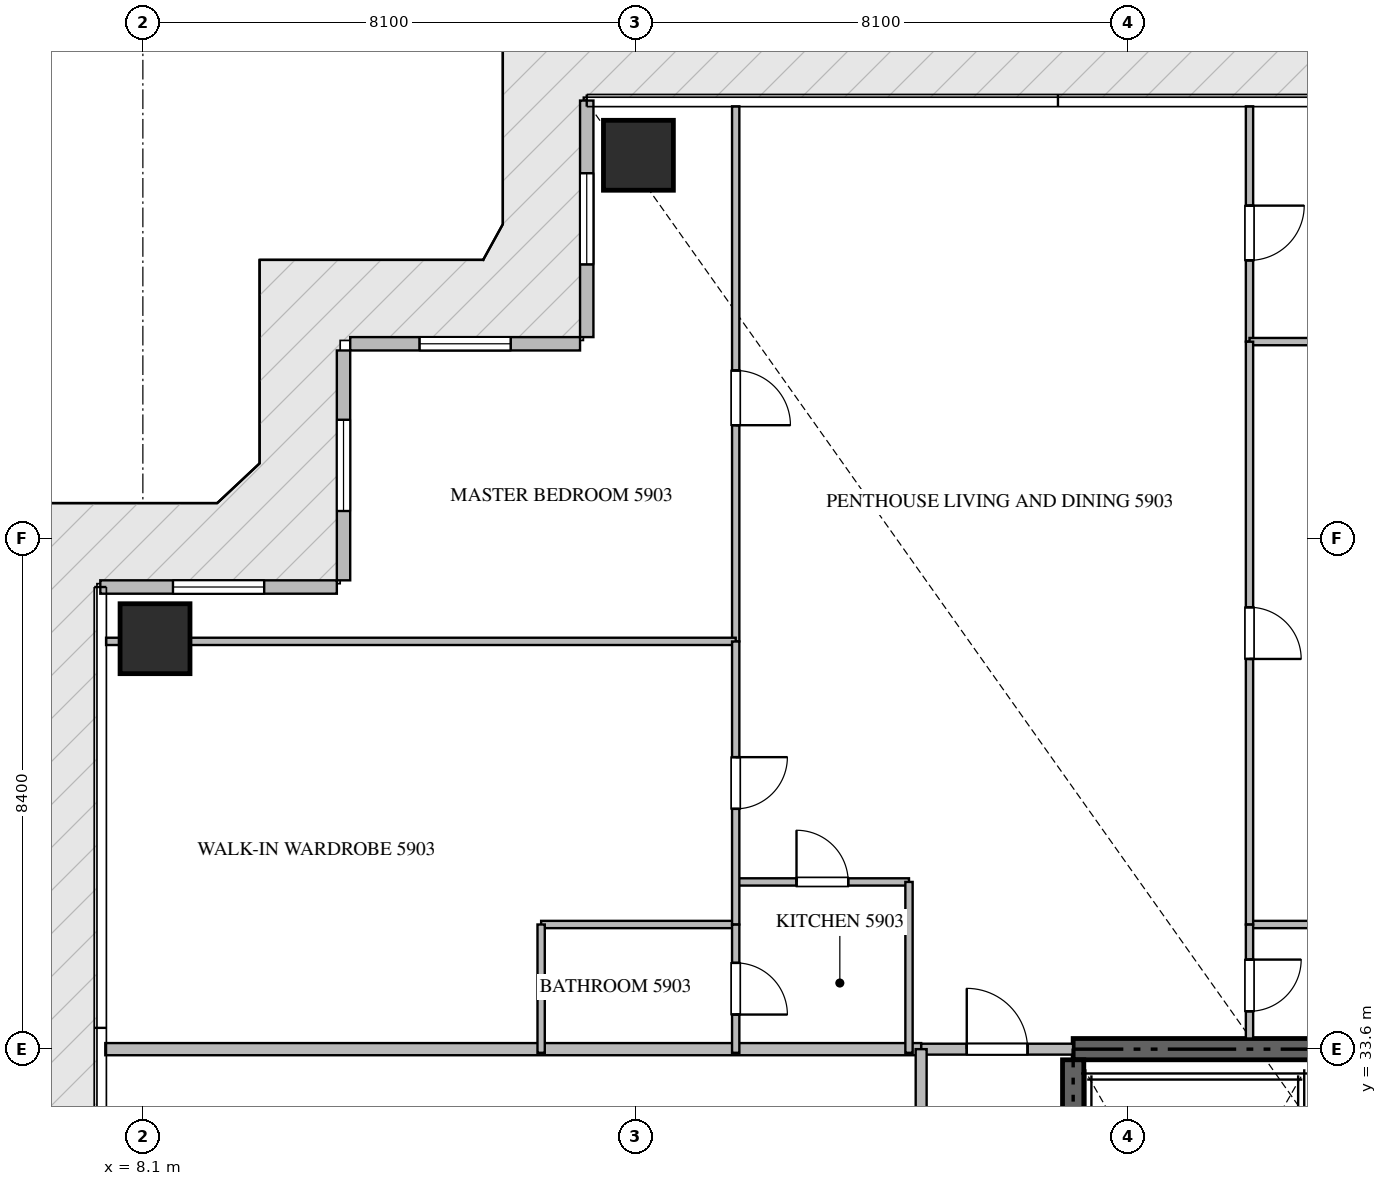
"""IFC4 building model, lengths in metres.
Left out: names, types, materials, properties, quantities, classifications, styles, units other than length and angle.
Written with IfcOpenShell. Run it as: python <this file> out.ifc"""

import sys

from ifc_helpers import new_model, si_unit, direction, frame, frame_2d, origin, origin_2d, place, context, subcontext, project, spatial, rectangle, extrude, source, transform, mapped, element, fill, save


model = new_model("IFC4")
c1 = context("Model", 3, precision=1e-05, world=origin(), true_north=direction((0.0, 1.0)))
c2 = subcontext(c1, "Body", "Model", "MODEL_VIEW")
j1 = project(units=[si_unit("LENGTHUNIT", "METRE"), si_unit("PLANEANGLEUNIT", "RADIAN")], contexts=[c1])
p1 = place(None, origin())
s1 = spatial("IfcSite", under=j1, at=p1, CompositionType="ELEMENT")
p2 = place(p1, origin())
s2 = spatial("IfcBuilding", under=s1, at=p2, CompositionType="ELEMENT")
p3 = place(p2, frame((0.0, 0.0, 237.4)))
s3 = spatial("IfcBuildingStorey", under=s2, at=p3, CompositionType="ELEMENT", Elevation=237.4)
p4 = place(p3, frame((41.4, 33.6, -0.26), z_axis=(0.0, 0.0, 1.0), x_axis=(-1.0, 0.0, 0.0)))
e1 = element("IfcWall", 1, at=p4, inside=s3, PredefinedType="SHEAR", context=c2, shape_type="SweptSolid", body=[
    extrude(rectangle(XDim=18.0, YDim=0.35, at=frame_2d((9.0, 0.0))), origin(), (0.0, 0.0, 1.0), 3.848),
])
p5 = place(p3, frame((23.4, 24.25, -0.26), z_axis=(0.0, 0.0, 1.0), x_axis=(0.0, 1.0, 0.0)))
e2 = element("IfcWall", 2, at=p5, inside=s3, PredefinedType="SHEAR", context=c2, shape_type="SweptSolid", body=[
    extrude(rectangle(XDim=9.175, YDim=0.35, at=frame_2d((4.587, 0.0))), origin(), (0.0, 0.0, 1.0), 3.848),
])
m1 = source(origin(), c2, "Body", "SweptSolid", [
    extrude(rectangle(XDim=1.15, YDim=1.15, at=origin_2d()), origin(), (0.0, 0.0, 1.0), 3.85),
])
for number, where, z_axis, x_axis in (
    (3, (16.25, 48.3, -0.26), (0.0, 0.0, 1.0), (1.0, 0.0, 0.0)),
    (4, (8.3, 40.35, -0.26), (0.0, 0.0, 1.0), (1.0, 0.0, 0.0)),
):
    element("IfcColumn", number, at=place(p3, frame(where, z_axis=z_axis, x_axis=x_axis)), inside=s3, PredefinedType="COLUMN", context=c2, shape_type="MappedRepresentation", body=[
        mapped(m1, transform((0.0, 0.0, 0.0), scale=1.0)),
    ])
p6 = place(p3, frame((15.4, 49.2, 0.0), z_axis=(0.0, 0.0, 1.0), x_axis=(0.0, -1.0, 0.0)))
e5 = element("IfcWall", 5, at=p6, inside=s3, PredefinedType="ELEMENTEDWALL", context=c2, shape_type="SweptSolid", body=[
    extrude(rectangle(XDim=3.89, YDim=0.22, at=frame_2d((1.945, 0.0))), origin(), (0.0, 0.0, 1.0), 3.575),
])
p7 = place(p6, frame((1.195, 0.0, 0.65)))
e6 = element("IfcOpeningElement", 6, at=p7, cuts=e5, PredefinedType="OPENING", context=c2, shape_type="SweptSolid", body=[
    extrude(rectangle(XDim=1.5, YDim=2.25, at=frame_2d((0.75, 1.125))), frame((0.0, 0.12, 0.0), z_axis=(0.0, -1.0, 0.0), x_axis=(1.0, 0.0, 0.0)), (0.0, 0.0, 1.0), 0.24),
])
p8 = place(p3, frame((15.29, 45.2, 0.0), z_axis=(0.0, 0.0, 1.0), x_axis=(-1.0, 0.0, 0.0)))
e7 = element("IfcWall", 7, at=p8, inside=s3, PredefinedType="ELEMENTEDWALL", context=c2, shape_type="SweptSolid", body=[
    extrude(rectangle(XDim=3.78, YDim=0.22, at=frame_2d((1.89, 0.0))), origin(), (0.0, 0.0, 1.0), 3.575),
])
p9 = place(p8, frame((1.14, 0.0, 0.65)))
e8 = element("IfcOpeningElement", 8, at=p9, cuts=e7, PredefinedType="OPENING", context=c2, shape_type="SweptSolid", body=[
    extrude(rectangle(XDim=1.5, YDim=2.25, at=frame_2d((0.75, 1.125))), frame((0.0, 0.12, 0.0), z_axis=(0.0, -1.0, 0.0), x_axis=(1.0, 0.0, 0.0)), (0.0, 0.0, 1.0), 0.24),
])
p10 = place(p3, frame((11.4, 45.09, 0.0), z_axis=(0.0, 0.0, 1.0), x_axis=(0.0, -1.0, 0.0)))
e9 = element("IfcWall", 9, at=p10, inside=s3, PredefinedType="ELEMENTEDWALL", context=c2, shape_type="SweptSolid", body=[
    extrude(rectangle(XDim=3.78, YDim=0.22, at=frame_2d((1.89, 0.0))), origin(), (0.0, 0.0, 1.0), 3.575),
])
p11 = place(p10, frame((1.14, 0.0, 0.65)))
e10 = element("IfcOpeningElement", 10, at=p11, cuts=e9, PredefinedType="OPENING", context=c2, shape_type="SweptSolid", body=[
    extrude(rectangle(XDim=1.5, YDim=2.25, at=frame_2d((0.75, 1.125))), frame((0.0, 0.12, 0.0), z_axis=(0.0, -1.0, 0.0), x_axis=(1.0, 0.0, 0.0)), (0.0, 0.0, 1.0), 0.24),
])
p12 = place(p3, frame((11.29, 41.2, 0.0), z_axis=(0.0, 0.0, 1.0), x_axis=(-1.0, 0.0, 0.0)))
e11 = element("IfcWall", 11, at=p12, inside=s3, PredefinedType="ELEMENTEDWALL", context=c2, shape_type="SweptSolid", body=[
    extrude(rectangle(XDim=3.89, YDim=0.22, at=frame_2d((1.945, 0.0))), origin(), (0.0, 0.0, 1.0), 3.575),
])
p13 = place(p12, frame((1.195, 0.0, 0.65)))
e12 = element("IfcOpeningElement", 12, at=p13, cuts=e11, PredefinedType="OPENING", context=c2, shape_type="SweptSolid", body=[
    extrude(rectangle(XDim=1.5, YDim=2.25, at=frame_2d((0.75, 1.125))), frame((0.0, 0.12, 0.0), z_axis=(0.0, -1.0, 0.0), x_axis=(1.0, 0.0, 0.0)), (0.0, 0.0, 1.0), 0.24),
])
p14 = place(p3, frame((7.482, 33.6, 0.0), z_axis=(0.0, 0.0, 1.0), x_axis=(1.0, 0.0, 0.0)))
e13 = element("IfcWall", 13, at=p14, inside=s3, PredefinedType="PARTITIONING", context=c2, shape_type="SweptSolid", body=[
    extrude(rectangle(XDim=13.418, YDim=0.2, at=frame_2d((6.709, 0.0))), origin(), (0.0, 0.0, 1.0), 3.59),
])
p15 = place(p3, frame((20.902, 33.6, 0.0), z_axis=(0.0, 0.0, 1.0), x_axis=(1.0, 0.0, 0.0)))
e14 = element("IfcWall", 14, at=p15, inside=s3, PredefinedType="PARTITIONING", context=c2, shape_type="SweptSolid", body=[
    extrude(rectangle(XDim=2.496, YDim=0.18, at=frame_2d((1.248, 0.0))), origin(), (0.0, 0.0, 1.0), 3.59),
])
p16 = place(p15, frame((0.748, 0.0, 0.0)))
e15 = element("IfcOpeningElement", 15, at=p16, cuts=e14, PredefinedType="OPENING", context=c2, shape_type="SweptSolid", body=[
    extrude(rectangle(XDim=1.0, YDim=2.15, at=frame_2d((0.5, 1.075))), frame((0.0, 0.1, 0.0), z_axis=(0.0, -1.0, 0.0), x_axis=(1.0, 0.0, 0.0)), (0.0, 0.0, 1.0), 0.2),
])
p17 = place(p3, frame((20.9, 16.8, 0.0), z_axis=(0.0, 0.0, 1.0), x_axis=(0.0, 1.0, 0.0)))
e16 = element("IfcWall", 16, at=p17, inside=s3, PredefinedType="PARTITIONING", context=c2, shape_type="SweptSolid", body=[
    extrude(rectangle(XDim=16.8, YDim=0.18, at=frame_2d((8.4, 0.0))), origin(), (0.0, 0.0, 1.0), 3.59),
])
p18 = place(p17, frame((1.3, 0.0, 0.0)))
e17 = element("IfcOpeningElement", 17, at=p18, cuts=e16, PredefinedType="OPENING", context=c2, shape_type="SweptSolid", body=[
    extrude(rectangle(XDim=1.0, YDim=2.15, at=frame_2d((0.5, 1.075))), frame((0.0, 0.1, 0.0), z_axis=(0.0, -1.0, 0.0), x_axis=(1.0, 0.0, 0.0)), (0.0, 0.0, 1.0), 0.2),
])
p19 = place(p17, frame((9.18, 0.0, 0.0)))
e18 = element("IfcOpeningElement", 18, at=p19, cuts=e16, PredefinedType="OPENING", context=c2, shape_type="SweptSolid", body=[
    extrude(rectangle(XDim=1.0, YDim=2.15, at=frame_2d((0.5, 1.075))), frame((0.0, 0.1, 0.0), z_axis=(0.0, -1.0, 0.0), x_axis=(1.0, 0.0, 0.0)), (0.0, 0.0, 1.0), 0.2),
])
p20 = place(p17, frame((14.5, 0.0, 0.0)))
e19 = element("IfcOpeningElement", 19, at=p20, cuts=e16, PredefinedType="OPENING", context=c2, shape_type="SweptSolid", body=[
    extrude(rectangle(XDim=1.0, YDim=2.15, at=frame_2d((0.5, 1.075))), frame((0.0, 0.1, 0.0), z_axis=(0.0, -1.0, 0.0), x_axis=(1.0, 0.0, 0.0)), (0.0, 0.0, 1.0), 0.2),
])
p21 = place(p3, frame((17.85, 36.35, 0.0), z_axis=(0.0, 0.0, 1.0), x_axis=(1.0, 0.0, 0.0)))
e20 = element("IfcWall", 20, at=p21, inside=s3, PredefinedType="PARTITIONING", context=c2, shape_type="SweptSolid", body=[
    extrude(rectangle(XDim=2.85, YDim=0.12, at=frame_2d((1.425, 0.0))), origin(), (0.0, 0.0, 1.0), 3.59),
])
p22 = place(p21, frame((1.0, 0.0, 0.0)))
e21 = element("IfcOpeningElement", 21, at=p22, cuts=e20, PredefinedType="OPENING", context=c2, shape_type="SweptSolid", body=[
    extrude(rectangle(XDim=0.85, YDim=2.1, at=frame_2d((0.425, 1.05))), frame((0.0, 0.07, 0.0), z_axis=(0.0, -1.0, 0.0), x_axis=(1.0, 0.0, 0.0)), (0.0, 0.0, 1.0), 0.14),
])
p23 = place(p3, frame((20.7, 36.35, 0.0), z_axis=(0.0, 0.0, 1.0), x_axis=(0.0, -1.0, 0.0)))
e22 = element("IfcWall", 22, at=p23, inside=s3, PredefinedType="PARTITIONING", context=c2, shape_type="SweptSolid", body=[
    extrude(rectangle(XDim=2.81, YDim=0.12, at=frame_2d((1.405, 0.0))), origin(), (0.0, 0.0, 1.0), 3.59),
])
p24 = place(p3, frame((17.85, 49.105, 0.0), z_axis=(0.0, 0.0, 1.0), x_axis=(0.0, -1.0, 0.0)))
e23 = element("IfcWall", 23, at=p24, inside=s3, PredefinedType="PARTITIONING", context=c2, shape_type="SweptSolid", body=[
    extrude(rectangle(XDim=8.799, YDim=0.12, at=frame_2d((4.399, 0.0))), origin(), (0.0, 0.0, 1.0), 3.59),
])
p25 = place(p24, frame((4.344, 0.0, 0.0)))
e24 = element("IfcOpeningElement", 24, at=p25, cuts=e23, PredefinedType="OPENING", context=c2, shape_type="SweptSolid", body=[
    extrude(rectangle(XDim=0.9, YDim=2.1, at=frame_2d((0.45, 1.05))), frame((0.0, 0.07, 0.0), z_axis=(0.0, -1.0, 0.0), x_axis=(1.0, 0.0, 0.0)), (0.0, 0.0, 1.0), 0.14),
])
p26 = place(p3, frame((7.495, 40.306, 0.0), z_axis=(0.0, 0.0, 1.0), x_axis=(1.0, 0.0, 0.0)))
e25 = element("IfcWall", 25, at=p26, inside=s3, PredefinedType="PARTITIONING", context=c2, shape_type="SweptSolid", body=[
    extrude(rectangle(XDim=10.355, YDim=0.12, at=frame_2d((5.177, 0.0))), origin(), (0.0, 0.0, 1.0), 3.122),
])
p27 = place(p3, frame((14.65, 35.65, 0.0), z_axis=(0.0, 0.0, 1.0), x_axis=(1.0, 0.0, 0.0)))
e26 = element("IfcWall", 26, at=p27, inside=s3, PredefinedType="PARTITIONING", context=c2, shape_type="SweptSolid", body=[
    extrude(rectangle(XDim=3.2, YDim=0.12, at=frame_2d((1.6, 0.0))), origin(), (0.0, 0.0, 1.0), 3.59),
])
p28 = place(p3, frame((14.65, 35.65, 0.0), z_axis=(0.0, 0.0, 1.0), x_axis=(0.0, -1.0, 0.0)))
e27 = element("IfcWall", 27, at=p28, inside=s3, PredefinedType="PARTITIONING", context=c2, shape_type="SweptSolid", body=[
    extrude(rectangle(XDim=2.11, YDim=0.12, at=frame_2d((1.055, 0.0))), origin(), (0.0, 0.0, 1.0), 3.59),
])
p29 = place(p3, frame((17.85, 40.304, 0.0), z_axis=(0.0, 0.0, 1.0), x_axis=(0.0, -1.0, 0.0)))
e28 = element("IfcWall", 28, at=p29, inside=s3, PredefinedType="PARTITIONING", context=c2, shape_type="SweptSolid", body=[
    extrude(rectangle(XDim=4.654, YDim=0.12, at=frame_2d((2.327, 0.0))), origin(), (0.0, 0.0, 1.0), 3.59),
])
p30 = place(p29, frame((1.902, 0.0, 0.0)))
e29 = element("IfcOpeningElement", 29, at=p30, cuts=e28, PredefinedType="OPENING", context=c2, shape_type="SweptSolid", body=[
    extrude(rectangle(XDim=0.85, YDim=2.1, at=frame_2d((0.425, 1.05))), frame((0.0, 0.07, 0.0), z_axis=(0.0, -1.0, 0.0), x_axis=(1.0, 0.0, 0.0)), (0.0, 0.0, 1.0), 0.14),
])
p31 = place(p3, frame((17.85, 35.648, 0.0), z_axis=(0.0, 0.0, 1.0), x_axis=(0.0, -1.0, 0.0)))
e30 = element("IfcWall", 30, at=p31, inside=s3, PredefinedType="PARTITIONING", context=c2, shape_type="SweptSolid", body=[
    extrude(rectangle(XDim=2.108, YDim=0.12, at=frame_2d((1.054, 0.0))), origin(), (0.0, 0.0, 1.0), 3.59),
])
p32 = place(p31, frame((0.629, 0.0, 0.0)))
e31 = element("IfcOpeningElement", 31, at=p32, cuts=e30, PredefinedType="OPENING", context=c2, shape_type="SweptSolid", body=[
    extrude(rectangle(XDim=0.85, YDim=2.1, at=frame_2d((0.425, 1.05))), frame((0.0, 0.07, 0.0), z_axis=(0.0, -1.0, 0.0), x_axis=(1.0, 0.0, 0.0)), (0.0, 0.0, 1.0), 0.14),
])
p33 = place(p3, frame((26.3, 49.105, 0.0), z_axis=(0.0, 0.0, 1.0), x_axis=(0.0, -1.0, 0.0)))
e32 = element("IfcWall", 32, at=p33, inside=s3, PredefinedType="PARTITIONING", context=c2, shape_type="SweptSolid", body=[
    extrude(rectangle(XDim=3.869, YDim=0.12, at=frame_2d((1.935, 0.0))), origin(), (0.0, 0.0, 1.0), 3.59),
])
p34 = place(p33, frame((1.633, 0.0, 0.0)))
e33 = element("IfcOpeningElement", 33, at=p34, cuts=e32, PredefinedType="OPENING", context=c2, shape_type="SweptSolid", body=[
    extrude(rectangle(XDim=0.9, YDim=2.1, at=frame_2d((0.45, 1.05))), frame((0.0, 0.07, 0.0), z_axis=(0.0, -1.0, 0.0), x_axis=(1.0, 0.0, 0.0)), (0.0, 0.0, 1.0), 0.14),
])
for number, where, z_axis, x_axis in (
    (34, (26.3, 45.236, 0.0), (0.0, 0.0, 1.0), (1.0, 0.0, 0.0)),
    (35, (26.3, 35.65, 0.0), (0.0, 0.0, 1.0), (1.0, 0.0, 0.0)),
):
    element("IfcWall", number, at=place(p3, frame(where, z_axis=z_axis, x_axis=x_axis)), inside=s3, PredefinedType="PARTITIONING", context=c2, shape_type="SweptSolid", body=[
        extrude(rectangle(XDim=9.06, YDim=0.12, at=frame_2d((4.53, 0.0))), origin(), (0.0, 0.0, 1.0), 3.59),
    ])
p35 = place(p3, frame((26.3, 45.234, 0.0), z_axis=(0.0, 0.0, 1.0), x_axis=(0.0, -1.0, 0.0)))
e36 = element("IfcWall", 36, at=p35, inside=s3, PredefinedType="PARTITIONING", context=c2, shape_type="SweptSolid", body=[
    extrude(rectangle(XDim=9.584, YDim=0.12, at=frame_2d((4.792, 0.0))), origin(), (0.0, 0.0, 1.0), 3.59),
])
p36 = place(p35, frame((4.367, 0.0, 0.0)))
e37 = element("IfcOpeningElement", 37, at=p36, cuts=e36, PredefinedType="OPENING", context=c2, shape_type="SweptSolid", body=[
    extrude(rectangle(XDim=0.85, YDim=2.1, at=frame_2d((0.425, 1.05))), frame((0.0, 0.07, 0.0), z_axis=(0.0, -1.0, 0.0), x_axis=(1.0, 0.0, 0.0)), (0.0, 0.0, 1.0), 0.14),
])
p37 = place(p3, frame((26.3, 35.648, 0.0), z_axis=(0.0, 0.0, 1.0), x_axis=(0.0, -1.0, 0.0)))
e38 = element("IfcWall", 38, at=p37, inside=s3, PredefinedType="PARTITIONING", context=c2, shape_type="SweptSolid", body=[
    extrude(rectangle(XDim=1.873, YDim=0.12, at=frame_2d((0.937, 0.0))), origin(), (0.0, 0.0, 1.0), 3.59),
])
p38 = place(p37, frame((0.575, 0.0, 0.0)))
e39 = element("IfcOpeningElement", 39, at=p38, cuts=e38, PredefinedType="OPENING", context=c2, shape_type="SweptSolid", body=[
    extrude(rectangle(XDim=0.85, YDim=2.1, at=frame_2d((0.425, 1.05))), frame((0.0, 0.07, 0.0), z_axis=(0.0, -1.0, 0.0), x_axis=(1.0, 0.0, 0.0)), (0.0, 0.0, 1.0), 0.14),
])
m2 = source(origin(), c2, "Body", "SweptSolid", [
    extrude(rectangle(XDim=1.5, YDim=2.25, at=frame_2d((0.75, 1.125))), frame((0.0, 0.03, 0.0), z_axis=(0.0, -1.0, 0.0), x_axis=(1.0, 0.0, 0.0)), (0.0, 0.0, 1.0), 0.06),
])
p39 = place(p7, origin())
e40 = element("IfcWindow", 40, at=p39, inside=s3, PartitioningType="SINGLE_PANEL", PredefinedType="WINDOW", context=c2, shape_type="MappedRepresentation", body=[
    mapped(m2, transform((0.0, 0.0, 0.0), scale=1.0)),
])
fill(e6, e40)
p40 = place(p9, origin())
e41 = element("IfcWindow", 41, at=p40, inside=s3, PartitioningType="SINGLE_PANEL", PredefinedType="WINDOW", context=c2, shape_type="MappedRepresentation", body=[
    mapped(m2, transform((0.0, 0.0, 0.0), scale=1.0)),
])
fill(e8, e41)
p41 = place(p11, origin())
e42 = element("IfcWindow", 42, at=p41, inside=s3, PartitioningType="SINGLE_PANEL", PredefinedType="WINDOW", context=c2, shape_type="MappedRepresentation", body=[
    mapped(m2, transform((0.0, 0.0, 0.0), scale=1.0)),
])
fill(e10, e42)
p42 = place(p13, origin())
e43 = element("IfcWindow", 43, at=p42, inside=s3, PartitioningType="SINGLE_PANEL", PredefinedType="WINDOW", context=c2, shape_type="MappedRepresentation", body=[
    mapped(m2, transform((0.0, 0.0, 0.0), scale=1.0)),
])
fill(e12, e43)
m3 = source(origin(), c2, "Body", "SweptSolid", [
    extrude(rectangle(XDim=1.0, YDim=2.15, at=frame_2d((0.5, 1.075))), frame((0.0, 0.025, 0.0), z_axis=(0.0, -1.0, 0.0), x_axis=(1.0, 0.0, 0.0)), (0.0, 0.0, 1.0), 0.05),
])
p43 = place(p16, origin())
e44 = element("IfcDoor", 44, at=p43, inside=s3, OperationType="SINGLE_SWING_LEFT", PredefinedType="DOOR", context=c2, shape_type="MappedRepresentation", body=[
    mapped(m3, transform((0.0, 0.0, 0.0), scale=1.0)),
])
fill(e15, e44)
m4 = source(origin(), c2, "Body", "SweptSolid", [
    extrude(rectangle(XDim=0.85, YDim=2.1, at=frame_2d((0.425, 1.05))), frame((0.0, 0.025, 0.0), z_axis=(0.0, -1.0, 0.0), x_axis=(1.0, 0.0, 0.0)), (0.0, 0.0, 1.0), 0.05),
])
p44 = place(p22, origin())
e45 = element("IfcDoor", 45, at=p44, inside=s3, OperationType="SINGLE_SWING_LEFT", PredefinedType="DOOR", context=c2, shape_type="MappedRepresentation", body=[
    mapped(m4, transform((0.0, 0.0, 0.0), scale=1.0)),
])
fill(e21, e45)
m5 = source(origin(), c2, "Body", "SweptSolid", [
    extrude(rectangle(XDim=0.9, YDim=2.1, at=frame_2d((0.45, 1.05))), frame((0.0, 0.025, 0.0), z_axis=(0.0, -1.0, 0.0), x_axis=(1.0, 0.0, 0.0)), (0.0, 0.0, 1.0), 0.05),
])
p45 = place(p25, origin())
e46 = element("IfcDoor", 46, at=p45, inside=s3, OperationType="SINGLE_SWING_RIGHT", PredefinedType="DOOR", context=c2, shape_type="MappedRepresentation", body=[
    mapped(m5, transform((0.0, 0.0, 0.0), scale=1.0)),
])
fill(e24, e46)
p46 = place(p30, origin())
e47 = element("IfcDoor", 47, at=p46, inside=s3, OperationType="SINGLE_SWING_LEFT", PredefinedType="DOOR", context=c2, shape_type="MappedRepresentation", body=[
    mapped(m4, transform((0.0, 0.0, 0.0), scale=1.0)),
])
fill(e29, e47)
p47 = place(p32, origin())
e48 = element("IfcDoor", 48, at=p47, inside=s3, OperationType="SINGLE_SWING_RIGHT", PredefinedType="DOOR", context=c2, shape_type="MappedRepresentation", body=[
    mapped(m4, transform((0.0, 0.0, 0.0), scale=1.0)),
])
fill(e31, e48)
p48 = place(p34, origin())
e49 = element("IfcDoor", 49, at=p48, inside=s3, OperationType="SINGLE_SWING_LEFT", PredefinedType="DOOR", context=c2, shape_type="MappedRepresentation", body=[
    mapped(m5, transform((0.0, 0.0, 0.0), scale=1.0)),
])
fill(e33, e49)
p49 = place(p36, origin())
e50 = element("IfcDoor", 50, at=p49, inside=s3, OperationType="SINGLE_SWING_RIGHT", PredefinedType="DOOR", context=c2, shape_type="MappedRepresentation", body=[
    mapped(m4, transform((0.0, 0.0, 0.0), scale=1.0)),
])
fill(e37, e50)
p50 = place(p38, origin())
e51 = element("IfcDoor", 51, at=p50, inside=s3, OperationType="SINGLE_SWING_LEFT", PredefinedType="DOOR", context=c2, shape_type="MappedRepresentation", body=[
    mapped(m4, transform((0.0, 0.0, 0.0), scale=1.0)),
])
fill(e39, e51)
save(model, sys.argv[1])
